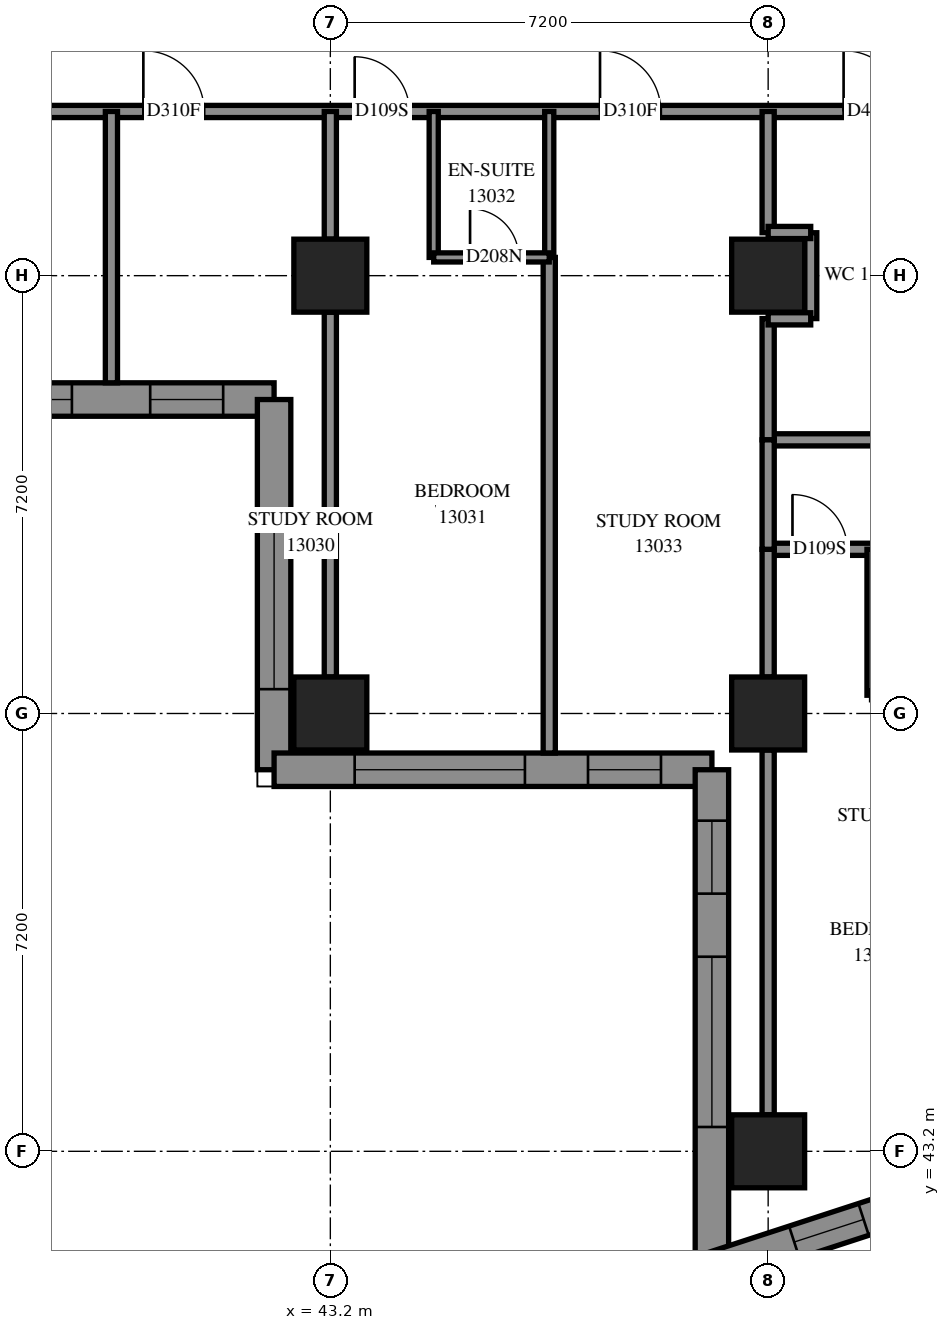
"""IFC4 building model, lengths in metres.
Left out: names, types, materials, properties, quantities, classifications, styles, units other than length and angle.
Written with IfcOpenShell. Run it as: python <this file> out.ifc"""

import sys

from ifc_helpers import new_model, si_unit, direction, frame, frame_2d, origin, origin_2d, place, context, subcontext, project, spatial, polyline, rectangle, outline, extrude, element, fill, save


model = new_model("IFC4")
c1 = context("Model", 3, precision=1e-05, world=origin(), true_north=direction((0.0, 1.0)))
c2 = subcontext(c1, "Body", "Model", "MODEL_VIEW")
j1 = project(units=[si_unit("LENGTHUNIT", "METRE"), si_unit("PLANEANGLEUNIT", "RADIAN")], contexts=[c1])
p1 = place(None, origin())
s1 = spatial("IfcSite", under=j1, at=p1, CompositionType="ELEMENT")
p2 = place(p1, origin())
s2 = spatial("IfcBuilding", under=s1, at=p2, CompositionType="ELEMENT")
p3 = place(p2, frame((0.0, 0.0, 50.8)))
s3 = spatial("IfcBuildingStorey", under=s2, at=p3, CompositionType="ELEMENT", Elevation=50.8)
for number, where, z_axis, x_axis in (
    (1, (43.2, 50.4, 0.0), (0.0, 0.0, 1.0), (1.0, 0.0, 0.0)),
    (2, (43.2, 57.6, 0.0), (0.0, 0.0, 1.0), (1.0, 0.0, 0.0)),
    (3, (50.4, 43.2, 0.0), (0.0, 0.0, 1.0), (1.0, 0.0, 0.0)),
    (4, (50.4, 50.4, 0.0), (0.0, 0.0, 1.0), (1.0, 0.0, 0.0)),
    (5, (50.4, 57.6, 0.0), (0.0, 0.0, 1.0), (1.0, 0.0, 0.0)),
):
    element("IfcColumn", number, at=place(p3, frame(where, z_axis=z_axis, x_axis=x_axis)), inside=s3, PredefinedType="COLUMN", context=c2, shape_type="SweptSolid", body=[
        extrude(rectangle(XDim=1.2, YDim=1.2, at=origin_2d()), origin(), (0.0, 0.0, 1.0), 3.1),
    ])
p4 = place(p3, frame((27.875, 55.563, 0.0), z_axis=(0.0, 0.0, 1.0), x_axis=(1.0, 0.0, 0.0)))
e6 = element("IfcWall", 6, at=p4, inside=s3, PredefinedType="SOLIDWALL", context=c2, shape_type="SweptSolid", body=[
    extrude(outline(polyline([(-0.275, -0.275), (14.125, -0.275), (14.675, 0.275), (0.275, 0.275), (-0.275, -0.275)])), origin(), (0.0, 0.0, 1.0), 3.1),
])
p5 = place(p4, frame((1.325, 0.0, 0.5)))
e7 = element("IfcOpeningElement", 7, at=p5, cuts=e6, PredefinedType="OPENING", context=c2, shape_type="SweptSolid", body=[
    extrude(rectangle(XDim=2.8, YDim=2.45, at=frame_2d((1.4, 1.225))), frame((0.0, 0.285, 0.0), z_axis=(0.0, -1.0, 0.0), x_axis=(1.0, 0.0, 0.0)), (0.0, 0.0, 1.0), 0.57),
])
p6 = place(p4, frame((4.925, 0.0, 0.5)))
e8 = element("IfcOpeningElement", 8, at=p6, cuts=e6, PredefinedType="OPENING", context=c2, shape_type="SweptSolid", body=[
    extrude(rectangle(XDim=2.8, YDim=2.45, at=frame_2d((1.4, 1.225))), frame((0.0, 0.285, 0.0), z_axis=(0.0, -1.0, 0.0), x_axis=(1.0, 0.0, 0.0)), (0.0, 0.0, 1.0), 0.57),
])
p7 = place(p4, frame((8.275, 0.0, 0.5)))
e9 = element("IfcOpeningElement", 9, at=p7, cuts=e6, PredefinedType="OPENING", context=c2, shape_type="SweptSolid", body=[
    extrude(rectangle(XDim=2.8, YDim=2.45, at=frame_2d((1.4, 1.225))), frame((0.0, 0.285, 0.0), z_axis=(0.0, -1.0, 0.0), x_axis=(1.0, 0.0, 0.0)), (0.0, 0.0, 1.0), 0.57),
])
p8 = place(p4, frame((12.363, 0.0, 0.5)))
e10 = element("IfcOpeningElement", 10, at=p8, cuts=e6, PredefinedType="OPENING", context=c2, shape_type="SweptSolid", body=[
    extrude(rectangle(XDim=1.2, YDim=2.45, at=frame_2d((0.6, 1.225))), frame((0.0, 0.285, 0.0), z_axis=(0.0, -1.0, 0.0), x_axis=(1.0, 0.0, 0.0)), (0.0, 0.0, 1.0), 0.57),
])
p9 = place(p3, frame((42.275, 55.563, 0.0), z_axis=(0.0, 0.0, 1.0), x_axis=(0.0, -1.0, 0.0)))
e11 = element("IfcWall", 11, at=p9, inside=s3, PredefinedType="SOLIDWALL", context=c2, shape_type="SweptSolid", body=[
    extrude(outline(polyline([(0.275, -0.275), (6.363, -0.275), (5.813, 0.275), (-0.275, 0.275), (0.275, -0.275)])), origin(), (0.0, 0.0, 1.0), 3.1),
])
p10 = place(p9, frame((1.963, 0.0, 0.5)))
e12 = element("IfcOpeningElement", 12, at=p10, cuts=e11, PredefinedType="OPENING", context=c2, shape_type="SweptSolid", body=[
    extrude(rectangle(XDim=2.8, YDim=2.45, at=frame_2d((1.4, 1.225))), frame((0.0, 0.285, 0.0), z_axis=(0.0, -1.0, 0.0), x_axis=(1.0, 0.0, 0.0)), (0.0, 0.0, 1.0), 0.57),
])
p11 = place(p3, frame((42.275, 49.475, 0.0), z_axis=(0.0, 0.0, 1.0), x_axis=(1.0, 0.0, 0.0)))
e13 = element("IfcWall", 13, at=p11, inside=s3, PredefinedType="SOLIDWALL", context=c2, shape_type="SweptSolid", body=[
    extrude(outline(polyline([(-0.275, -0.275), (6.925, -0.275), (7.475, 0.275), (0.275, 0.275), (-0.275, -0.275)])), origin(), (0.0, 0.0, 1.0), 3.1),
])
p12 = place(p11, frame((1.325, 0.0, 0.5)))
e14 = element("IfcOpeningElement", 14, at=p12, cuts=e13, PredefinedType="OPENING", context=c2, shape_type="SweptSolid", body=[
    extrude(rectangle(XDim=2.8, YDim=2.45, at=frame_2d((1.4, 1.225))), frame((0.0, 0.285, 0.0), z_axis=(0.0, -1.0, 0.0), x_axis=(1.0, 0.0, 0.0)), (0.0, 0.0, 1.0), 0.57),
])
p13 = place(p11, frame((5.162, 0.0, 0.5)))
e15 = element("IfcOpeningElement", 15, at=p13, cuts=e13, PredefinedType="OPENING", context=c2, shape_type="SweptSolid", body=[
    extrude(rectangle(XDim=1.2, YDim=2.45, at=frame_2d((0.6, 1.225))), frame((0.0, 0.285, 0.0), z_axis=(0.0, -1.0, 0.0), x_axis=(1.0, 0.0, 0.0)), (0.0, 0.0, 1.0), 0.57),
])
p14 = place(p3, frame((49.475, 49.475, 0.0), z_axis=(0.0, 0.0, 1.0), x_axis=(0.0, -1.0, 0.0)))
e16 = element("IfcWall", 16, at=p14, inside=s3, PredefinedType="SOLIDWALL", context=c2, shape_type="SweptSolid", body=[
    extrude(outline(polyline([(0.275, -0.275), (8.587, -0.275), (7.829, 0.275), (-0.275, 0.275), (0.275, -0.275)])), origin(), (0.0, 0.0, 1.0), 3.1),
])
p15 = place(p14, frame((3.075, 0.0, 0.5)))
e17 = element("IfcOpeningElement", 17, at=p15, cuts=e16, PredefinedType="OPENING", context=c2, shape_type="SweptSolid", body=[
    extrude(rectangle(XDim=2.8, YDim=2.45, at=frame_2d((1.4, 1.225))), frame((0.0, 0.285, 0.0), z_axis=(0.0, -1.0, 0.0), x_axis=(1.0, 0.0, 0.0)), (0.0, 0.0, 1.0), 0.57),
])
p16 = place(p14, frame((0.838, 0.0, 0.5)))
e18 = element("IfcOpeningElement", 18, at=p16, cuts=e16, PredefinedType="OPENING", context=c2, shape_type="SweptSolid", body=[
    extrude(rectangle(XDim=1.2, YDim=2.45, at=frame_2d((0.6, 1.225))), frame((0.0, 0.285, 0.0), z_axis=(0.0, -1.0, 0.0), x_axis=(1.0, 0.0, 0.0)), (0.0, 0.0, 1.0), 0.57),
])
p17 = place(p3, frame((49.475, 41.267, 0.0), z_axis=(0.0, 0.0, 1.0), x_axis=(0.9507812873, 0.3098627821, 0.0)))
e19 = element("IfcWall", 19, at=p17, inside=s3, PredefinedType="SOLIDWALL", context=c2, shape_type="SweptSolid", body=[
    extrude(outline(polyline([(-0.379, -0.275), (3.21, -0.275), (3.34, 0.275), (0.379, 0.275), (-0.379, -0.275)])), origin(), (0.0, 0.0, 1.0), 3.1),
])
p18 = place(p17, frame((1.424, 0.0, 0.5)))
e20 = element("IfcOpeningElement", 20, at=p18, cuts=e19, PredefinedType="OPENING", context=c2, shape_type="SweptSolid", body=[
    extrude(rectangle(XDim=1.2, YDim=2.45, at=frame_2d((0.6, 1.225))), frame((0.0, 0.285, 0.0), z_axis=(0.0, -1.0, 0.0), x_axis=(1.0, 0.0, 0.0)), (0.0, 0.0, 1.0), 0.57),
])
p19 = place(p3, frame((28.802, 60.3, 0.0), z_axis=(0.0, 0.0, 1.0), x_axis=(1.0, 0.0, 0.0)))
e21 = element("IfcWall", 21, at=p19, inside=s3, PredefinedType="PARTITIONING", context=c2, shape_type="SweptSolid", body=[
    extrude(rectangle(XDim=24.108, YDim=0.2, at=frame_2d((12.054, 0.0))), origin(), (0.0, 0.0, 1.0), 3.1),
])
p20 = place(p19, frame((11.323, 0.0, 0.0)))
e22 = element("IfcOpeningElement", 22, at=p20, cuts=e21, PredefinedType="OPENING", context=c2, shape_type="SweptSolid", body=[
    extrude(rectangle(XDim=1.0, YDim=2.1, at=frame_2d((0.5, 1.05))), frame((0.0, 0.11, 0.0), z_axis=(0.0, -1.0, 0.0), x_axis=(1.0, 0.0, 0.0)), (0.0, 0.0, 1.0), 0.22),
])
p21 = place(p19, frame((14.798, 0.0, 0.0)))
e23 = element("IfcOpeningElement", 23, at=p21, cuts=e21, PredefinedType="OPENING", context=c2, shape_type="SweptSolid", body=[
    extrude(rectangle(XDim=0.9, YDim=2.1, at=frame_2d((0.45, 1.05))), frame((0.0, 0.11, 0.0), z_axis=(0.0, -1.0, 0.0), x_axis=(1.0, 0.0, 0.0)), (0.0, 0.0, 1.0), 0.22),
])
p22 = place(p19, frame((18.833, 0.0, 0.0)))
e24 = element("IfcOpeningElement", 24, at=p22, cuts=e21, PredefinedType="OPENING", context=c2, shape_type="SweptSolid", body=[
    extrude(rectangle(XDim=1.0, YDim=2.1, at=frame_2d((0.5, 1.05))), frame((0.0, 0.11, 0.0), z_axis=(0.0, -1.0, 0.0), x_axis=(1.0, 0.0, 0.0)), (0.0, 0.0, 1.0), 0.22),
])
p23 = place(p19, frame((22.839, 0.0, 0.0)))
e25 = element("IfcOpeningElement", 25, at=p23, cuts=e21, PredefinedType="OPENING", context=c2, shape_type="SweptSolid", body=[
    extrude(rectangle(XDim=1.0, YDim=2.1, at=frame_2d((0.5, 1.05))), frame((0.0, 0.11, 0.0), z_axis=(0.0, -1.0, 0.0), x_axis=(1.0, 0.0, 0.0)), (0.0, 0.0, 1.0), 0.22),
])
p24 = place(p3, frame((46.8, 49.75, 0.0), z_axis=(0.0, 0.0, 1.0), x_axis=(0.0, 1.0, 0.0)))
e26 = element("IfcWall", 26, at=p24, inside=s3, PredefinedType="PARTITIONING", context=c2, shape_type="SweptSolid", body=[
    extrude(rectangle(XDim=8.15, YDim=0.2, at=frame_2d((4.075, 0.0))), origin(), (0.0, 0.0, 1.0), 3.1),
])
for number, where, z_axis, x_axis in (
    (27, (43.2, 51.0, 0.0), (0.0, 0.0, 1.0), (0.0, 1.0, 0.0)),
    (28, (50.4, 43.8, 0.0), (0.0, 0.0, 1.0), (0.0, 1.0, 0.0)),
):
    element("IfcWall", number, at=place(p3, frame(where, z_axis=z_axis, x_axis=x_axis)), inside=s3, PredefinedType="PARTITIONING", context=c2, shape_type="SweptSolid", body=[
        extrude(rectangle(XDim=6.0, YDim=0.2, at=frame_2d((3.0, 0.0))), origin(), (0.0, 0.0, 1.0), 2.6),
    ])
p25 = place(p3, frame((39.6, 55.838, 0.0), z_axis=(0.0, 0.0, 1.0), x_axis=(0.0, 1.0, 0.0)))
e29 = element("IfcWall", 29, at=p25, inside=s3, PredefinedType="PARTITIONING", context=c2, shape_type="SweptSolid", body=[
    extrude(rectangle(XDim=4.462, YDim=0.2, at=frame_2d((2.231, 0.0))), origin(), (0.0, 0.0, 1.0), 3.1),
])
p26 = place(p3, frame((50.4, 53.1, 0.0), z_axis=(0.0, 0.0, 1.0), x_axis=(1.0, 0.0, 0.0)))
e30 = element("IfcWall", 30, at=p26, inside=s3, PredefinedType="PARTITIONING", context=c2, shape_type="SweptSolid", body=[
    extrude(rectangle(XDim=4.1, YDim=0.2, at=frame_2d((2.05, 0.0))), origin(), (0.0, 0.0, 1.0), 3.1),
])
p27 = place(p26, frame((0.4, 0.0, 0.0)))
e31 = element("IfcOpeningElement", 31, at=p27, cuts=e30, PredefinedType="OPENING", context=c2, shape_type="SweptSolid", body=[
    extrude(rectangle(XDim=0.9, YDim=2.1, at=frame_2d((0.45, 1.05))), frame((0.0, 0.11, 0.0), z_axis=(0.0, -1.0, 0.0), x_axis=(1.0, 0.0, 0.0)), (0.0, 0.0, 1.0), 0.22),
])
p28 = place(p3, frame((50.4, 54.9, 0.0), z_axis=(0.0, 0.0, 1.0), x_axis=(1.0, 0.0, 0.0)))
e32 = element("IfcWall", 32, at=p28, inside=s3, PredefinedType="PARTITIONING", context=c2, shape_type="SweptSolid", body=[
    extrude(rectangle(XDim=2.51, YDim=0.2, at=frame_2d((1.255, 0.0))), origin(), (0.0, 0.0, 1.0), 3.1),
])
for number, where, z_axis, x_axis in (
    (33, (44.9, 57.9, 0.0), (0.0, 0.0, 1.0), (0.0, 1.0, 0.0)),
    (34, (46.8, 57.9, 0.0), (0.0, 0.0, 1.0), (0.0, 1.0, 0.0)),
    (35, (52.1, 50.7, 0.0), (0.0, 0.0, 1.0), (0.0, 1.0, 0.0)),
):
    element("IfcWall", number, at=place(p3, frame(where, z_axis=z_axis, x_axis=x_axis)), inside=s3, PredefinedType="PARTITIONING", context=c2, shape_type="SweptSolid", body=[
        extrude(rectangle(XDim=2.4, YDim=0.15, at=frame_2d((1.2, 0.0))), origin(), (0.0, 0.0, 1.0), 3.1),
    ])
for number, where, z_axis, x_axis in (
    (36, (50.4, 51.0, 0.0), (0.0, 0.0, 1.0), (0.0, 1.0, 0.0)),
    (37, (43.2, 58.2, 0.0), (0.0, 0.0, 1.0), (0.0, 1.0, 0.0)),
):
    element("IfcWall", number, at=place(p3, frame(where, z_axis=z_axis, x_axis=x_axis)), inside=s3, PredefinedType="PARTITIONING", context=c2, shape_type="SweptSolid", body=[
        extrude(rectangle(XDim=2.1, YDim=0.2, at=frame_2d((1.05, 0.0))), origin(), (0.0, 0.0, 1.0), 3.1),
    ])
for number, where, z_axis, x_axis in (
    (38, (50.4, 54.9, 0.0), (0.0, 0.0, 1.0), (0.0, 1.0, 0.0)),
    (39, (50.4, 58.306, 0.0), (0.0, 0.0, 1.0), (0.0, 1.0, 0.0)),
):
    element("IfcWall", number, at=place(p3, frame(where, z_axis=z_axis, x_axis=x_axis)), inside=s3, PredefinedType="PARTITIONING", context=c2, shape_type="SweptSolid", body=[
        extrude(rectangle(XDim=1.994, YDim=0.2, at=frame_2d((0.997, 0.0))), origin(), (0.0, 0.0, 1.0), 3.1),
    ])
p29 = place(p3, frame((44.9, 57.9, 0.0), z_axis=(0.0, 0.0, 1.0), x_axis=(1.0, 0.0, 0.0)))
e40 = element("IfcWall", 40, at=p29, inside=s3, PredefinedType="PARTITIONING", context=c2, shape_type="SweptSolid", body=[
    extrude(rectangle(XDim=1.9, YDim=0.15, at=frame_2d((0.95, 0.0))), origin(), (0.0, 0.0, 1.0), 3.1),
])
p30 = place(p29, frame((0.598, 0.0, 0.0)))
e41 = element("IfcOpeningElement", 41, at=p30, cuts=e40, PredefinedType="OPENING", context=c2, shape_type="SweptSolid", body=[
    extrude(rectangle(XDim=0.8, YDim=2.1, at=frame_2d((0.4, 1.05))), frame((0.0, 0.085, 0.0), z_axis=(0.0, -1.0, 0.0), x_axis=(1.0, 0.0, 0.0)), (0.0, 0.0, 1.0), 0.17),
])
p31 = place(p3, frame((50.4, 53.1, 0.0), z_axis=(0.0, 0.0, 1.0), x_axis=(0.0, 1.0, 0.0)))
e42 = element("IfcWall", 42, at=p31, inside=s3, PredefinedType="PARTITIONING", context=c2, shape_type="SweptSolid", body=[
    extrude(rectangle(XDim=1.8, YDim=0.2, at=frame_2d((0.9, 0.0))), origin(), (0.0, 0.0, 1.0), 3.1),
])
p32 = place(p3, frame((51.1, 56.894, 0.0), z_axis=(0.0, 0.0, 1.0), x_axis=(0.0, 1.0, 0.0)))
e43 = element("IfcWall", 43, at=p32, inside=s3, PredefinedType="PARTITIONING", context=c2, shape_type="SweptSolid", body=[
    extrude(rectangle(XDim=1.412, YDim=0.2, at=frame_2d((0.706, 0.0))), origin(), (0.0, 0.0, 1.0), 3.1),
])
for number, where, z_axis, x_axis in (
    (44, (50.4, 58.31, 0.0), (0.0, 0.0, 1.0), (1.0, 0.0, 0.0)),
    (45, (50.4, 56.89, 0.0), (0.0, 0.0, 1.0), (1.0, 0.0, 0.0)),
):
    element("IfcWall", number, at=place(p3, frame(where, z_axis=z_axis, x_axis=x_axis)), inside=s3, PredefinedType="PARTITIONING", context=c2, shape_type="SweptSolid", body=[
        extrude(rectangle(XDim=0.7, YDim=0.2, at=frame_2d((0.35, 0.0))), origin(), (0.0, 0.0, 1.0), 3.1),
    ])
p33 = place(p7, origin())
e46 = element("IfcWindow", 46, at=p33, inside=s3, PartitioningType="SINGLE_PANEL", PredefinedType="WINDOW", context=c2, shape_type="SweptSolid", body=[
    extrude(rectangle(XDim=2.8, YDim=2.45, at=frame_2d((1.4, 1.225))), frame((0.0, 0.155, 0.0), z_axis=(0.0, -1.0, 0.0), x_axis=(1.0, 0.0, 0.0)), (0.0, 0.0, 1.0), 0.06),
])
fill(e9, e46)
p34 = place(p8, origin())
e47 = element("IfcWindow", 47, at=p34, inside=s3, PartitioningType="SINGLE_PANEL", PredefinedType="WINDOW", context=c2, shape_type="SweptSolid", body=[
    extrude(rectangle(XDim=1.2, YDim=2.45, at=frame_2d((0.6, 1.225))), frame((0.0, 0.155, 0.0), z_axis=(0.0, -1.0, 0.0), x_axis=(1.0, 0.0, 0.0)), (0.0, 0.0, 1.0), 0.06),
])
fill(e10, e47)
p35 = place(p10, origin())
e48 = element("IfcWindow", 48, at=p35, inside=s3, PartitioningType="SINGLE_PANEL", PredefinedType="WINDOW", context=c2, shape_type="SweptSolid", body=[
    extrude(rectangle(XDim=2.8, YDim=2.45, at=frame_2d((1.4, 1.225))), frame((0.0, 0.155, 0.0), z_axis=(0.0, -1.0, 0.0), x_axis=(1.0, 0.0, 0.0)), (0.0, 0.0, 1.0), 0.06),
])
fill(e12, e48)
p36 = place(p12, origin())
e49 = element("IfcWindow", 49, at=p36, inside=s3, PartitioningType="SINGLE_PANEL", PredefinedType="WINDOW", context=c2, shape_type="SweptSolid", body=[
    extrude(rectangle(XDim=2.8, YDim=2.45, at=frame_2d((1.4, 1.225))), frame((0.0, 0.155, 0.0), z_axis=(0.0, -1.0, 0.0), x_axis=(1.0, 0.0, 0.0)), (0.0, 0.0, 1.0), 0.06),
])
fill(e14, e49)
p37 = place(p13, origin())
e50 = element("IfcWindow", 50, at=p37, inside=s3, PartitioningType="SINGLE_PANEL", PredefinedType="WINDOW", context=c2, shape_type="SweptSolid", body=[
    extrude(rectangle(XDim=1.2, YDim=2.45, at=frame_2d((0.6, 1.225))), frame((0.0, 0.155, 0.0), z_axis=(0.0, -1.0, 0.0), x_axis=(1.0, 0.0, 0.0)), (0.0, 0.0, 1.0), 0.06),
])
fill(e15, e50)
p38 = place(p15, origin())
e51 = element("IfcWindow", 51, at=p38, inside=s3, PartitioningType="SINGLE_PANEL", PredefinedType="WINDOW", context=c2, shape_type="SweptSolid", body=[
    extrude(rectangle(XDim=2.8, YDim=2.45, at=frame_2d((1.4, 1.225))), frame((0.0, 0.155, 0.0), z_axis=(0.0, -1.0, 0.0), x_axis=(1.0, 0.0, 0.0)), (0.0, 0.0, 1.0), 0.06),
])
fill(e17, e51)
p39 = place(p16, origin())
e52 = element("IfcWindow", 52, at=p39, inside=s3, PartitioningType="SINGLE_PANEL", PredefinedType="WINDOW", context=c2, shape_type="SweptSolid", body=[
    extrude(rectangle(XDim=1.2, YDim=2.45, at=frame_2d((0.6, 1.225))), frame((0.0, 0.155, 0.0), z_axis=(0.0, -1.0, 0.0), x_axis=(1.0, 0.0, 0.0)), (0.0, 0.0, 1.0), 0.06),
])
fill(e18, e52)
p40 = place(p18, origin())
e53 = element("IfcWindow", 53, at=p40, inside=s3, PartitioningType="SINGLE_PANEL", PredefinedType="WINDOW", context=c2, shape_type="SweptSolid", body=[
    extrude(rectangle(XDim=1.2, YDim=2.45, at=frame_2d((0.6, 1.225))), frame((0.0, 0.155, 0.0), z_axis=(0.0, -1.0, 0.0), x_axis=(1.0, 0.0, 0.0)), (0.0, 0.0, 1.0), 0.06),
])
fill(e20, e53)
p41 = place(p20, origin())
e54 = element("IfcDoor", 54, at=p41, inside=s3, OperationType="SINGLE_SWING_RIGHT", PredefinedType="DOOR", context=c2, shape_type="SweptSolid", body=[
    extrude(rectangle(XDim=1.0, YDim=2.1, at=frame_2d((0.5, 1.05))), frame((0.0, 0.025, 0.0), z_axis=(0.0, -1.0, 0.0), x_axis=(1.0, 0.0, 0.0)), (0.0, 0.0, 1.0), 0.05),
])
fill(e22, e54)
p42 = place(p21, origin())
e55 = element("IfcDoor", 55, at=p42, inside=s3, OperationType="SINGLE_SWING_LEFT", PredefinedType="DOOR", context=c2, shape_type="SweptSolid", body=[
    extrude(rectangle(XDim=0.9, YDim=2.1, at=frame_2d((0.45, 1.05))), frame((0.0, 0.025, 0.0), z_axis=(0.0, -1.0, 0.0), x_axis=(1.0, 0.0, 0.0)), (0.0, 0.0, 1.0), 0.05),
])
fill(e23, e55)
p43 = place(p30, origin())
e56 = element("IfcDoor", 56, at=p43, inside=s3, OperationType="SINGLE_SWING_RIGHT", PredefinedType="DOOR", context=c2, shape_type="SweptSolid", body=[
    extrude(rectangle(XDim=0.8, YDim=2.1, at=frame_2d((0.4, 1.05))), frame((0.0, 0.025, 0.0), z_axis=(0.0, -1.0, 0.0), x_axis=(1.0, 0.0, 0.0)), (0.0, 0.0, 1.0), 0.05),
])
fill(e41, e56)
p44 = place(p22, origin())
e57 = element("IfcDoor", 57, at=p44, inside=s3, OperationType="SINGLE_SWING_RIGHT", PredefinedType="DOOR", context=c2, shape_type="SweptSolid", body=[
    extrude(rectangle(XDim=1.0, YDim=2.1, at=frame_2d((0.5, 1.05))), frame((0.0, 0.025, 0.0), z_axis=(0.0, -1.0, 0.0), x_axis=(1.0, 0.0, 0.0)), (0.0, 0.0, 1.0), 0.05),
])
fill(e24, e57)
p45 = place(p23, origin())
e58 = element("IfcDoor", 58, at=p45, inside=s3, OperationType="SINGLE_SWING_LEFT", PredefinedType="DOOR", context=c2, shape_type="SweptSolid", body=[
    extrude(rectangle(XDim=1.0, YDim=2.1, at=frame_2d((0.5, 1.05))), frame((0.0, 0.025, 0.0), z_axis=(0.0, -1.0, 0.0), x_axis=(1.0, 0.0, 0.0)), (0.0, 0.0, 1.0), 0.05),
])
fill(e25, e58)
p46 = place(p27, origin())
e59 = element("IfcDoor", 59, at=p46, inside=s3, OperationType="SINGLE_SWING_LEFT", PredefinedType="DOOR", context=c2, shape_type="SweptSolid", body=[
    extrude(rectangle(XDim=0.9, YDim=2.1, at=frame_2d((0.45, 1.05))), frame((0.0, 0.025, 0.0), z_axis=(0.0, -1.0, 0.0), x_axis=(1.0, 0.0, 0.0)), (0.0, 0.0, 1.0), 0.05),
])
fill(e31, e59)
save(model, sys.argv[1])
